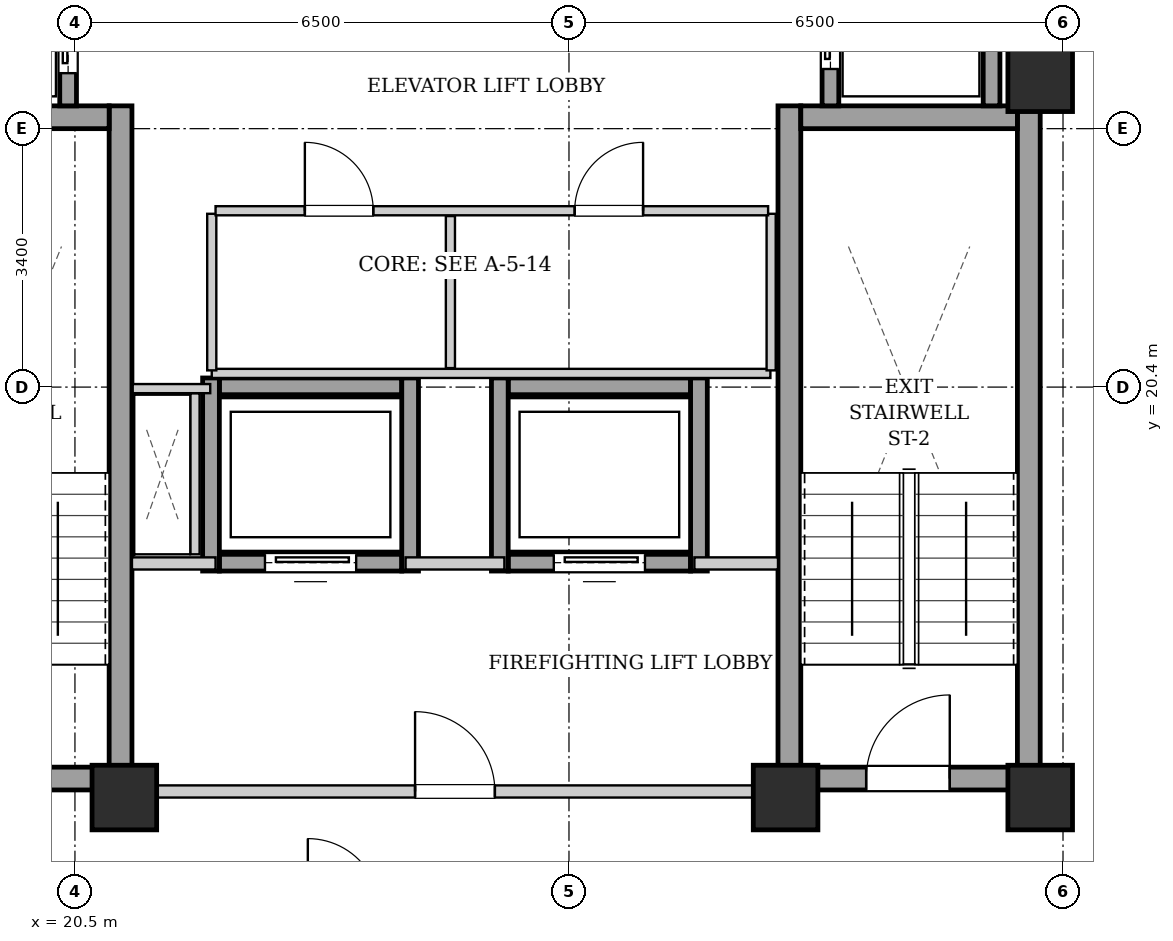
"""IFC4 building model, lengths in metres.
Left out: names, types, materials, properties, quantities, classifications, styles, units other than length and angle.
Written with IfcOpenShell. Run it as: python <this file> out.ifc"""

import sys

from ifc_helpers import new_model, si_unit, direction, frame, frame_2d, origin, origin_2d, place, context, subcontext, project, spatial, rectangle, extrude, element, fill, save


model = new_model("IFC4")
c1 = context("Model", 3, precision=1e-05, world=origin(), true_north=direction((0.0, 1.0)))
c2 = subcontext(c1, "Body", "Model", "MODEL_VIEW")
j1 = project(units=[si_unit("LENGTHUNIT", "METRE"), si_unit("PLANEANGLEUNIT", "RADIAN")], contexts=[c1])
p1 = place(None, origin())
s1 = spatial("IfcSite", under=j1, at=p1, CompositionType="ELEMENT")
p2 = place(p1, origin())
s2 = spatial("IfcBuilding", under=s1, at=p2, CompositionType="ELEMENT")
p3 = place(p2, frame((0.0, 0.0, 194.2)))
s3 = spatial("IfcBuildingStorey", under=s2, at=p3, CompositionType="ELEMENT", Elevation=194.2)
for number, where, z_axis, x_axis in (
    (1, (21.15, 15.0, 0.0), (0.0, 0.0, 1.0), (1.0, 0.0, 0.0)),
    (2, (29.85, 15.0, 0.0), (0.0, 0.0, 1.0), (1.0, 0.0, 0.0)),
    (3, (33.2, 15.0, 0.0), (0.0, 0.0, 1.0), (1.0, 0.0, 0.0)),
    (4, (33.2, 24.45, 0.0), (0.0, 0.0, 1.0), (1.0, 0.0, 0.0)),
):
    element("IfcColumn", number, at=place(p3, frame(where, z_axis=z_axis, x_axis=x_axis)), inside=s3, PredefinedType="COLUMN", context=c2, shape_type="SweptSolid", body=[
        extrude(rectangle(XDim=0.85, YDim=0.85, at=origin_2d()), origin(), (0.0, 0.0, 1.0), 3.3),
    ])
p4 = place(p3, frame((21.1, 15.1, 0.0), z_axis=(0.0, 0.0, 1.0), x_axis=(0.0, 1.0, 0.0)))
e5 = element("IfcWall", 5, at=p4, inside=s3, PredefinedType="SHEAR", context=c2, shape_type="SweptSolid", body=[
    extrude(rectangle(XDim=9.0, YDim=0.3, at=frame_2d((4.5, 0.0))), origin(), (0.0, 0.0, 1.0), 3.04),
])
p5 = place(p3, frame((18.1, 23.95, 0.0), z_axis=(0.0, 0.0, 1.0), x_axis=(1.0, 0.0, 0.0)))
e6 = element("IfcWall", 6, at=p5, inside=s3, PredefinedType="SHEAR", context=c2, shape_type="SweptSolid", body=[
    extrude(rectangle(XDim=2.85, YDim=0.3, at=frame_2d((1.425, 0.0))), origin(), (0.0, 0.0, 1.0), 3.04),
])
p6 = place(p3, frame((18.1, 15.25, 0.0), z_axis=(0.0, 0.0, 1.0), x_axis=(1.0, 0.0, 0.0)))
e7 = element("IfcWall", 7, at=p6, inside=s3, PredefinedType="SHEAR", context=c2, shape_type="SweptSolid", body=[
    extrude(rectangle(XDim=2.85, YDim=0.3, at=frame_2d((1.425, 0.0))), origin(), (0.0, 0.0, 1.0), 3.04),
])
p7 = place(p6, frame((0.86, 0.0, 0.0)))
e8 = element("IfcOpeningElement", 8, at=p7, cuts=e7, PredefinedType="OPENING", context=c2, shape_type="SweptSolid", body=[
    extrude(rectangle(XDim=1.1, YDim=2.05, at=frame_2d((0.55, 1.025))), frame((0.0, 0.16, 0.0), z_axis=(0.0, -1.0, 0.0), x_axis=(1.0, 0.0, 0.0)), (0.0, 0.0, 1.0), 0.32),
])
for number, where, z_axis, x_axis in (
    (9, (29.9, 15.1, 0.0), (0.0, 0.0, 1.0), (0.0, 1.0, 0.0)),
    (10, (33.05, 15.1, 0.0), (0.0, 0.0, 1.0), (0.0, 1.0, 0.0)),
):
    element("IfcWall", number, at=place(p3, frame(where, z_axis=z_axis, x_axis=x_axis)), inside=s3, PredefinedType="SHEAR", context=c2, shape_type="SweptSolid", body=[
        extrude(rectangle(XDim=9.0, YDim=0.3, at=frame_2d((4.5, 0.0))), origin(), (0.0, 0.0, 1.0), 3.04),
    ])
p8 = place(p3, frame((30.05, 23.95, 0.0), z_axis=(0.0, 0.0, 1.0), x_axis=(1.0, 0.0, 0.0)))
e11 = element("IfcWall", 11, at=p8, inside=s3, PredefinedType="SHEAR", context=c2, shape_type="SweptSolid", body=[
    extrude(rectangle(XDim=2.85, YDim=0.3, at=frame_2d((1.425, 0.0))), origin(), (0.0, 0.0, 1.0), 3.04),
])
p9 = place(p3, frame((30.05, 15.25, 0.0), z_axis=(0.0, 0.0, 1.0), x_axis=(1.0, 0.0, 0.0)))
e12 = element("IfcWall", 12, at=p9, inside=s3, PredefinedType="SHEAR", context=c2, shape_type="SweptSolid", body=[
    extrude(rectangle(XDim=2.85, YDim=0.3, at=frame_2d((1.425, 0.0))), origin(), (0.0, 0.0, 1.0), 3.04),
])
p10 = place(p9, frame((0.86, 0.0, 0.0)))
e13 = element("IfcOpeningElement", 13, at=p10, cuts=e12, PredefinedType="OPENING", context=c2, shape_type="SweptSolid", body=[
    extrude(rectangle(XDim=1.1, YDim=2.05, at=frame_2d((0.55, 1.025))), frame((0.0, 0.16, 0.0), z_axis=(0.0, -1.0, 0.0), x_axis=(1.0, 0.0, 0.0)), (0.0, 0.0, 1.0), 0.32),
])
p11 = place(p3, frame((20.41, 24.1, 0.0), z_axis=(0.0, 0.0, 1.0), x_axis=(0.0, 1.0, 0.0)))
e14 = element("IfcWall", 14, at=p11, inside=s3, PredefinedType="SHEAR", context=c2, shape_type="SweptSolid", body=[
    extrude(rectangle(XDim=1.96, YDim=0.22, at=frame_2d((0.98, 0.0))), origin(), (0.0, 0.0, 1.0), 3.04),
])
p12 = place(p11, frame((0.43, 0.0, 0.0)))
e15 = element("IfcOpeningElement", 15, at=p12, cuts=e14, PredefinedType="OPENING", context=c2, shape_type="SweptSolid", body=[
    extrude(rectangle(XDim=1.1, YDim=2.15, at=frame_2d((0.55, 1.075))), frame((0.0, 0.12, 0.0), z_axis=(0.0, -1.0, 0.0), x_axis=(1.0, 0.0, 0.0)), (0.0, 0.0, 1.0), 0.24),
])
p13 = place(p3, frame((30.44, 24.1, 0.0), z_axis=(0.0, 0.0, 1.0), x_axis=(0.0, 1.0, 0.0)))
e16 = element("IfcWall", 16, at=p13, inside=s3, PredefinedType="SHEAR", context=c2, shape_type="SweptSolid", body=[
    extrude(rectangle(XDim=2.07, YDim=0.22, at=frame_2d((1.035, 0.0))), origin(), (0.0, 0.0, 1.0), 3.04),
])
p14 = place(p13, frame((0.485, 0.0, 0.0)))
e17 = element("IfcOpeningElement", 17, at=p14, cuts=e16, PredefinedType="OPENING", context=c2, shape_type="SweptSolid", body=[
    extrude(rectangle(XDim=1.1, YDim=2.15, at=frame_2d((0.55, 1.075))), frame((0.0, 0.12, 0.0), z_axis=(0.0, -1.0, 0.0), x_axis=(1.0, 0.0, 0.0)), (0.0, 0.0, 1.0), 0.24),
])
p15 = place(p3, frame((32.56, 24.1, 0.0), z_axis=(0.0, 0.0, 1.0), x_axis=(0.0, 1.0, 0.0)))
e18 = element("IfcWall", 18, at=p15, inside=s3, PredefinedType="SHEAR", context=c2, shape_type="SweptSolid", body=[
    extrude(rectangle(XDim=2.07, YDim=0.22, at=frame_2d((1.035, 0.0))), origin(), (0.0, 0.0, 1.0), 3.04),
])
p16 = place(p3, frame((22.4, 18.09, 0.0), z_axis=(0.0, 0.0, 1.0), x_axis=(1.0, 0.0, 0.0)))
e19 = element("IfcWall", 19, at=p16, inside=s3, PredefinedType="SHEAR", context=c2, shape_type="SweptSolid", body=[
    extrude(rectangle(XDim=2.4, YDim=0.22, at=frame_2d((1.2, 0.0))), origin(), (0.0, 0.0, 1.0), 3.04),
])
p17 = place(p16, frame((0.6, 0.0, 0.0)))
e20 = element("IfcOpeningElement", 20, at=p17, cuts=e19, PredefinedType="OPENING", context=c2, shape_type="SweptSolid", body=[
    extrude(rectangle(XDim=1.2, YDim=2.15, at=frame_2d((0.6, 1.075))), frame((0.0, 0.12, 0.0), z_axis=(0.0, -1.0, 0.0), x_axis=(1.0, 0.0, 0.0)), (0.0, 0.0, 1.0), 0.24),
])
p18 = place(p3, frame((22.4, 20.41, 0.0), z_axis=(0.0, 0.0, 1.0), x_axis=(1.0, 0.0, 0.0)))
e21 = element("IfcWall", 21, at=p18, inside=s3, PredefinedType="SHEAR", context=c2, shape_type="SweptSolid", body=[
    extrude(rectangle(XDim=2.4, YDim=0.22, at=frame_2d((1.2, 0.0))), origin(), (0.0, 0.0, 1.0), 3.04),
])
for number, where, z_axis, x_axis in (
    (22, (22.29, 17.98, 0.0), (0.0, 0.0, 1.0), (0.0, 1.0, 0.0)),
    (23, (24.91, 17.98, 0.0), (0.0, 0.0, 1.0), (0.0, 1.0, 0.0)),
):
    element("IfcWall", number, at=place(p3, frame(where, z_axis=z_axis, x_axis=x_axis)), inside=s3, PredefinedType="SHEAR", context=c2, shape_type="SweptSolid", body=[
        extrude(rectangle(XDim=2.54, YDim=0.22, at=frame_2d((1.27, 0.0))), origin(), (0.0, 0.0, 1.0), 3.04),
    ])
p19 = place(p3, frame((26.2, 18.09, 0.0), z_axis=(0.0, 0.0, 1.0), x_axis=(1.0, 0.0, 0.0)))
e24 = element("IfcWall", 24, at=p19, inside=s3, PredefinedType="SHEAR", context=c2, shape_type="SweptSolid", body=[
    extrude(rectangle(XDim=2.4, YDim=0.22, at=frame_2d((1.2, 0.0))), origin(), (0.0, 0.0, 1.0), 3.04),
])
p20 = place(p19, frame((0.6, 0.0, 0.0)))
e25 = element("IfcOpeningElement", 25, at=p20, cuts=e24, PredefinedType="OPENING", context=c2, shape_type="SweptSolid", body=[
    extrude(rectangle(XDim=1.2, YDim=2.15, at=frame_2d((0.6, 1.075))), frame((0.0, 0.12, 0.0), z_axis=(0.0, -1.0, 0.0), x_axis=(1.0, 0.0, 0.0)), (0.0, 0.0, 1.0), 0.24),
])
p21 = place(p3, frame((26.2, 20.41, 0.0), z_axis=(0.0, 0.0, 1.0), x_axis=(1.0, 0.0, 0.0)))
e26 = element("IfcWall", 26, at=p21, inside=s3, PredefinedType="SHEAR", context=c2, shape_type="SweptSolid", body=[
    extrude(rectangle(XDim=2.4, YDim=0.22, at=frame_2d((1.2, 0.0))), origin(), (0.0, 0.0, 1.0), 3.04),
])
for number, where, z_axis, x_axis in (
    (27, (26.09, 17.98, 0.0), (0.0, 0.0, 1.0), (0.0, 1.0, 0.0)),
    (28, (28.71, 17.98, 0.0), (0.0, 0.0, 1.0), (0.0, 1.0, 0.0)),
):
    element("IfcWall", number, at=place(p3, frame(where, z_axis=z_axis, x_axis=x_axis)), inside=s3, PredefinedType="SHEAR", context=c2, shape_type="SweptSolid", body=[
        extrude(rectangle(XDim=2.54, YDim=0.22, at=frame_2d((1.27, 0.0))), origin(), (0.0, 0.0, 1.0), 3.04),
    ])
p22 = place(p3, frame((21.25, 15.08, 0.0), z_axis=(0.0, 0.0, 1.0), x_axis=(1.0, 0.0, 0.0)))
e29 = element("IfcWall", 29, at=p22, inside=s3, PredefinedType="PARTITIONING", context=c2, shape_type="SweptSolid", body=[
    extrude(rectangle(XDim=8.5, YDim=0.16, at=frame_2d((4.25, 0.0))), origin(), (0.0, 0.0, 1.0), 2.556),
])
p23 = place(p22, frame((3.725, 0.0, 0.0)))
e30 = element("IfcOpeningElement", 30, at=p23, cuts=e29, PredefinedType="OPENING", context=c2, shape_type="SweptSolid", body=[
    extrude(rectangle(XDim=1.05, YDim=2.05, at=frame_2d((0.525, 1.025))), frame((0.0, 0.09, 0.0), z_axis=(0.0, -1.0, 0.0), x_axis=(1.0, 0.0, 0.0)), (0.0, 0.0, 1.0), 0.18),
])
p24 = place(p3, frame((21.25, 18.08, 0.0), z_axis=(0.0, 0.0, 1.0), x_axis=(1.0, 0.0, 0.0)))
e31 = element("IfcWall", 31, at=p24, inside=s3, PredefinedType="PARTITIONING", context=c2, shape_type="SweptSolid", body=[
    extrude(rectangle(XDim=1.1, YDim=0.16, at=frame_2d((0.55, 0.0))), origin(), (0.0, 0.0, 1.0), 3.04),
])
p25 = place(p3, frame((24.85, 18.08, 0.0), z_axis=(0.0, 0.0, 1.0), x_axis=(1.0, 0.0, 0.0)))
e32 = element("IfcWall", 32, at=p25, inside=s3, PredefinedType="PARTITIONING", context=c2, shape_type="SweptSolid", body=[
    extrude(rectangle(XDim=1.3, YDim=0.16, at=frame_2d((0.65, 0.0))), origin(), (0.0, 0.0, 1.0), 3.04),
])
p26 = place(p3, frame((28.65, 18.08, 0.0), z_axis=(0.0, 0.0, 1.0), x_axis=(1.0, 0.0, 0.0)))
e33 = element("IfcWall", 33, at=p26, inside=s3, PredefinedType="PARTITIONING", context=c2, shape_type="SweptSolid", body=[
    extrude(rectangle(XDim=1.1, YDim=0.16, at=frame_2d((0.55, 0.0))), origin(), (0.0, 0.0, 1.0), 3.04),
])
p27 = place(p3, frame((33.12, 24.12, 0.0), z_axis=(0.0, 0.0, 1.0), x_axis=(0.0, 1.0, 0.0)))
e34 = element("IfcWall", 34, at=p27, inside=s3, PredefinedType="PARTITIONING", context=c2, shape_type="SweptSolid", body=[
    extrude(rectangle(XDim=4.76, YDim=0.16, at=frame_2d((2.38, 0.0))), origin(), (0.0, 0.0, 1.0), 3.04),
])
p28 = place(p3, frame((22.08, 18.2, 0.0), z_axis=(0.0, 0.0, 1.0), x_axis=(0.0, 1.0, 0.0)))
e35 = element("IfcWall", 35, at=p28, inside=s3, PredefinedType="PARTITIONING", context=c2, shape_type="SweptSolid", body=[
    extrude(rectangle(XDim=2.12, YDim=0.12, at=frame_2d((1.06, 0.0))), origin(), (0.0, 0.0, 1.0), 3.04),
])
p29 = place(p3, frame((22.28, 20.38, 0.0), z_axis=(0.0, 0.0, 1.0), x_axis=(-1.0, 0.0, 0.0)))
e36 = element("IfcWall", 36, at=p29, inside=s3, PredefinedType="PARTITIONING", context=c2, shape_type="SweptSolid", body=[
    extrude(rectangle(XDim=1.02, YDim=0.12, at=frame_2d((0.51, 0.0))), origin(), (0.0, 0.0, 1.0), 3.04),
])
p30 = place(p3, frame((22.3, 20.58, 0.0), z_axis=(0.0, 0.0, 1.0), x_axis=(1.0, 0.0, 0.0)))
e37 = element("IfcWall", 37, at=p30, inside=s3, PredefinedType="PARTITIONING", context=c2, shape_type="SweptSolid", body=[
    extrude(rectangle(XDim=7.35, YDim=0.12, at=frame_2d((3.675, 0.0))), origin(), (0.0, 0.0, 1.0), 3.04),
])
for number, where, z_axis, x_axis in (
    (38, (22.3, 20.62, 0.0), (0.0, 0.0, 1.0), (0.0, 1.0, 0.0)),
    (39, (29.66, 20.62, 0.0), (0.0, 0.0, 1.0), (0.0, 1.0, 0.0)),
):
    element("IfcWall", number, at=place(p3, frame(where, z_axis=z_axis, x_axis=x_axis)), inside=s3, PredefinedType="PARTITIONING", context=c2, shape_type="SweptSolid", body=[
        extrude(rectangle(XDim=2.06, YDim=0.12, at=frame_2d((1.03, 0.0))), origin(), (0.0, 0.0, 1.0), 3.04),
    ])
p31 = place(p3, frame((25.44, 20.65, 0.0), z_axis=(0.0, 0.0, 1.0), x_axis=(0.0, 1.0, 0.0)))
e40 = element("IfcWall", 40, at=p31, inside=s3, PredefinedType="PARTITIONING", context=c2, shape_type="SweptSolid", body=[
    extrude(rectangle(XDim=2.0, YDim=0.12, at=frame_2d((1.0, 0.0))), origin(), (0.0, 0.0, 1.0), 3.04),
])
p32 = place(p3, frame((22.35, 22.72, 0.0), z_axis=(0.0, 0.0, 1.0), x_axis=(1.0, 0.0, 0.0)))
e41 = element("IfcWall", 41, at=p32, inside=s3, PredefinedType="PARTITIONING", context=c2, shape_type="SweptSolid", body=[
    extrude(rectangle(XDim=7.27, YDim=0.12, at=frame_2d((3.635, 0.0))), origin(), (0.0, 0.0, 1.0), 3.04),
])
p33 = place(p32, frame((1.175, 0.0, 0.0)))
e42 = element("IfcOpeningElement", 42, at=p33, cuts=e41, PredefinedType="OPENING", context=c2, shape_type="SweptSolid", body=[
    extrude(rectangle(XDim=0.9, YDim=2.05, at=frame_2d((0.45, 1.025))), frame((0.0, 0.07, 0.0), z_axis=(0.0, -1.0, 0.0), x_axis=(1.0, 0.0, 0.0)), (0.0, 0.0, 1.0), 0.14),
])
p34 = place(p32, frame((4.725, 0.0, 0.0)))
e43 = element("IfcOpeningElement", 43, at=p34, cuts=e41, PredefinedType="OPENING", context=c2, shape_type="SweptSolid", body=[
    extrude(rectangle(XDim=0.9, YDim=2.05, at=frame_2d((0.45, 1.025))), frame((0.0, 0.07, 0.0), z_axis=(0.0, -1.0, 0.0), x_axis=(1.0, 0.0, 0.0)), (0.0, 0.0, 1.0), 0.14),
])
p35 = place(p10, origin())
e44 = element("IfcDoor", 44, at=p35, inside=s3, OperationType="SINGLE_SWING_RIGHT", PredefinedType="DOOR", context=c2, shape_type="SweptSolid", body=[
    extrude(rectangle(XDim=1.1, YDim=2.05, at=frame_2d((0.55, 1.025))), frame((0.0, 0.025, 0.0), z_axis=(0.0, -1.0, 0.0), x_axis=(1.0, 0.0, 0.0)), (0.0, 0.0, 1.0), 0.05),
])
fill(e13, e44)
p36 = place(p12, origin())
e45 = element("IfcDoor", 45, at=p36, inside=s3, OperationType="SLIDING_TO_LEFT", PredefinedType="DOOR", context=c2, shape_type="SweptSolid", body=[
    extrude(rectangle(XDim=1.1, YDim=2.15, at=frame_2d((0.55, 1.075))), frame((0.0, 0.025, 0.0), z_axis=(0.0, -1.0, 0.0), x_axis=(1.0, 0.0, 0.0)), (0.0, 0.0, 1.0), 0.05),
])
fill(e15, e45)
p37 = place(p14, origin())
e46 = element("IfcDoor", 46, at=p37, inside=s3, OperationType="SLIDING_TO_LEFT", PredefinedType="DOOR", context=c2, shape_type="SweptSolid", body=[
    extrude(rectangle(XDim=1.1, YDim=2.15, at=frame_2d((0.55, 1.075))), frame((0.0, 0.025, 0.0), z_axis=(0.0, -1.0, 0.0), x_axis=(1.0, 0.0, 0.0)), (0.0, 0.0, 1.0), 0.05),
])
fill(e17, e46)
p38 = place(p17, origin())
e47 = element("IfcDoor", 47, at=p38, inside=s3, OperationType="SLIDING_TO_LEFT", PredefinedType="DOOR", context=c2, shape_type="SweptSolid", body=[
    extrude(rectangle(XDim=1.2, YDim=2.15, at=frame_2d((0.6, 1.075))), frame((0.0, 0.025, 0.0), z_axis=(0.0, -1.0, 0.0), x_axis=(1.0, 0.0, 0.0)), (0.0, 0.0, 1.0), 0.05),
])
fill(e20, e47)
p39 = place(p20, origin())
e48 = element("IfcDoor", 48, at=p39, inside=s3, OperationType="SLIDING_TO_LEFT", PredefinedType="DOOR", context=c2, shape_type="SweptSolid", body=[
    extrude(rectangle(XDim=1.2, YDim=2.15, at=frame_2d((0.6, 1.075))), frame((0.0, 0.025, 0.0), z_axis=(0.0, -1.0, 0.0), x_axis=(1.0, 0.0, 0.0)), (0.0, 0.0, 1.0), 0.05),
])
fill(e25, e48)
p40 = place(p23, origin())
e49 = element("IfcDoor", 49, at=p40, inside=s3, OperationType="SINGLE_SWING_LEFT", PredefinedType="DOOR", context=c2, shape_type="SweptSolid", body=[
    extrude(rectangle(XDim=1.05, YDim=2.05, at=frame_2d((0.525, 1.025))), frame((0.0, 0.025, 0.0), z_axis=(0.0, -1.0, 0.0), x_axis=(1.0, 0.0, 0.0)), (0.0, 0.0, 1.0), 0.05),
])
fill(e30, e49)
p41 = place(p33, origin())
e50 = element("IfcDoor", 50, at=p41, inside=s3, OperationType="SINGLE_SWING_LEFT", PredefinedType="DOOR", context=c2, shape_type="SweptSolid", body=[
    extrude(rectangle(XDim=0.9, YDim=2.05, at=frame_2d((0.45, 1.025))), frame((0.0, 0.025, 0.0), z_axis=(0.0, -1.0, 0.0), x_axis=(1.0, 0.0, 0.0)), (0.0, 0.0, 1.0), 0.05),
])
fill(e42, e50)
p42 = place(p34, origin())
e51 = element("IfcDoor", 51, at=p42, inside=s3, OperationType="SINGLE_SWING_RIGHT", PredefinedType="DOOR", context=c2, shape_type="SweptSolid", body=[
    extrude(rectangle(XDim=0.9, YDim=2.05, at=frame_2d((0.45, 1.025))), frame((0.0, 0.025, 0.0), z_axis=(0.0, -1.0, 0.0), x_axis=(1.0, 0.0, 0.0)), (0.0, 0.0, 1.0), 0.05),
])
fill(e43, e51)
save(model, sys.argv[1])
